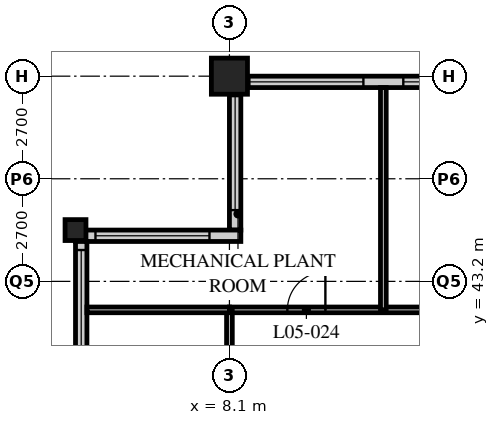
"""IFC4 building model, lengths in metres.
Left out: names, types, materials, properties, quantities, classifications, styles, units other than length and angle.
Written with IfcOpenShell. Run it as: python <this file> out.ifc"""

import sys

from ifc_helpers import new_model, si_unit, direction, frame, frame_2d, origin, origin_2d, place, context, subcontext, project, spatial, rectangle, hollow_rectangle, extrude, element, fill, save


model = new_model("IFC4")
c1 = context("Model", 3, precision=1e-05, world=origin(), true_north=direction((0.0, 1.0)))
c2 = subcontext(c1, "Body", "Model", "MODEL_VIEW")
j1 = project(units=[si_unit("LENGTHUNIT", "METRE"), si_unit("PLANEANGLEUNIT", "RADIAN")], contexts=[c1])
p1 = place(None, origin())
s1 = spatial("IfcSite", under=j1, at=p1, CompositionType="ELEMENT")
p2 = place(p1, origin())
s2 = spatial("IfcBuilding", under=s1, at=p2, CompositionType="ELEMENT")
p3 = place(p2, frame((0.0, 0.0, 27.6)))
s3 = spatial("IfcBuildingStorey", under=s2, at=p3, CompositionType="ELEMENT", Elevation=27.6)
p4 = place(p3, frame((4.05, 44.55, 0.0), z_axis=(0.0, 0.0, 1.0), x_axis=(1.0, 0.0, 0.0)))
e1 = element("IfcColumn", 1, at=p4, inside=s3, PredefinedType="COLUMN", context=c2, shape_type="SweptSolid", body=[
    extrude(hollow_rectangle(XDim=0.55, YDim=0.55, WallThickness=0.05, at=origin_2d()), origin(), (0.0, 0.0, 1.0), 5.4),
])
p5 = place(p3, frame((8.1, 48.6, 0.0), z_axis=(0.0, 0.0, 1.0), x_axis=(1.0, 0.0, 0.0)))
e2 = element("IfcColumn", 2, at=p5, inside=s3, PredefinedType="COLUMN", context=c2, shape_type="SweptSolid", body=[
    extrude(hollow_rectangle(XDim=0.95, YDim=0.95, WallThickness=0.1, at=origin_2d()), origin(), (0.0, 0.0, 1.0), 5.4),
])
p6 = place(p3, frame((48.3, 48.45, 0.0), z_axis=(0.0, 0.0, 1.0), x_axis=(-1.0, 0.0, 0.0)))
e3 = element("IfcWall", 3, at=p6, inside=s3, PredefinedType="SOLIDWALL", context=c2, shape_type="SweptSolid", body=[
    extrude(rectangle(XDim=40.2, YDim=0.3, at=frame_2d((20.1, 0.0))), origin(), (0.0, 0.0, 1.0), 5.19),
])
p7 = place(p6, frame((0.225, 0.0, 0.9)))
e4 = element("IfcOpeningElement", 4, at=p7, cuts=e3, PredefinedType="OPENING", context=c2, shape_type="SweptSolid", body=[
    extrude(rectangle(XDim=3.0, YDim=3.0, at=frame_2d((1.5, 1.5))), frame((0.0, 0.16, 0.0), z_axis=(0.0, -1.0, 0.0), x_axis=(1.0, 0.0, 0.0)), (0.0, 0.0, 1.0), 0.32),
])
p8 = place(p6, frame((4.275, 0.0, 0.9)))
e5 = element("IfcOpeningElement", 5, at=p8, cuts=e3, PredefinedType="OPENING", context=c2, shape_type="SweptSolid", body=[
    extrude(rectangle(XDim=3.0, YDim=3.0, at=frame_2d((1.5, 1.5))), frame((0.0, 0.16, 0.0), z_axis=(0.0, -1.0, 0.0), x_axis=(1.0, 0.0, 0.0)), (0.0, 0.0, 1.0), 0.32),
])
p9 = place(p6, frame((8.325, 0.0, 0.9)))
e6 = element("IfcOpeningElement", 6, at=p9, cuts=e3, PredefinedType="OPENING", context=c2, shape_type="SweptSolid", body=[
    extrude(rectangle(XDim=3.0, YDim=3.0, at=frame_2d((1.5, 1.5))), frame((0.0, 0.16, 0.0), z_axis=(0.0, -1.0, 0.0), x_axis=(1.0, 0.0, 0.0)), (0.0, 0.0, 1.0), 0.32),
])
p10 = place(p6, frame((12.375, 0.0, 0.9)))
e7 = element("IfcOpeningElement", 7, at=p10, cuts=e3, PredefinedType="OPENING", context=c2, shape_type="SweptSolid", body=[
    extrude(rectangle(XDim=3.0, YDim=3.0, at=frame_2d((1.5, 1.5))), frame((0.0, 0.16, 0.0), z_axis=(0.0, -1.0, 0.0), x_axis=(1.0, 0.0, 0.0)), (0.0, 0.0, 1.0), 0.32),
])
p11 = place(p6, frame((16.425, 0.0, 0.9)))
e8 = element("IfcOpeningElement", 8, at=p11, cuts=e3, PredefinedType="OPENING", context=c2, shape_type="SweptSolid", body=[
    extrude(rectangle(XDim=3.0, YDim=3.0, at=frame_2d((1.5, 1.5))), frame((0.0, 0.16, 0.0), z_axis=(0.0, -1.0, 0.0), x_axis=(1.0, 0.0, 0.0)), (0.0, 0.0, 1.0), 0.32),
])
p12 = place(p6, frame((20.475, 0.0, 0.9)))
e9 = element("IfcOpeningElement", 9, at=p12, cuts=e3, PredefinedType="OPENING", context=c2, shape_type="SweptSolid", body=[
    extrude(rectangle(XDim=3.0, YDim=3.0, at=frame_2d((1.5, 1.5))), frame((0.0, 0.16, 0.0), z_axis=(0.0, -1.0, 0.0), x_axis=(1.0, 0.0, 0.0)), (0.0, 0.0, 1.0), 0.32),
])
p13 = place(p6, frame((24.525, 0.0, 0.9)))
e10 = element("IfcOpeningElement", 10, at=p13, cuts=e3, PredefinedType="OPENING", context=c2, shape_type="SweptSolid", body=[
    extrude(rectangle(XDim=3.0, YDim=3.0, at=frame_2d((1.5, 1.5))), frame((0.0, 0.16, 0.0), z_axis=(0.0, -1.0, 0.0), x_axis=(1.0, 0.0, 0.0)), (0.0, 0.0, 1.0), 0.32),
])
p14 = place(p6, frame((28.575, 0.0, 0.9)))
e11 = element("IfcOpeningElement", 11, at=p14, cuts=e3, PredefinedType="OPENING", context=c2, shape_type="SweptSolid", body=[
    extrude(rectangle(XDim=3.0, YDim=3.0, at=frame_2d((1.5, 1.5))), frame((0.0, 0.16, 0.0), z_axis=(0.0, -1.0, 0.0), x_axis=(1.0, 0.0, 0.0)), (0.0, 0.0, 1.0), 0.32),
])
p15 = place(p6, frame((32.625, 0.0, 0.9)))
e12 = element("IfcOpeningElement", 12, at=p15, cuts=e3, PredefinedType="OPENING", context=c2, shape_type="SweptSolid", body=[
    extrude(rectangle(XDim=3.0, YDim=3.0, at=frame_2d((1.5, 1.5))), frame((0.0, 0.16, 0.0), z_axis=(0.0, -1.0, 0.0), x_axis=(1.0, 0.0, 0.0)), (0.0, 0.0, 1.0), 0.32),
])
p16 = place(p6, frame((36.675, 0.0, 0.9)))
e13 = element("IfcOpeningElement", 13, at=p16, cuts=e3, PredefinedType="OPENING", context=c2, shape_type="SweptSolid", body=[
    extrude(rectangle(XDim=3.0, YDim=3.0, at=frame_2d((1.5, 1.5))), frame((0.0, 0.16, 0.0), z_axis=(0.0, -1.0, 0.0), x_axis=(1.0, 0.0, 0.0)), (0.0, 0.0, 1.0), 0.32),
])
p17 = place(p3, frame((8.25, 48.3, 0.0), z_axis=(0.0, 0.0, 1.0), x_axis=(0.0, -1.0, 0.0)))
e14 = element("IfcWall", 14, at=p17, inside=s3, PredefinedType="SOLIDWALL", context=c2, shape_type="SweptSolid", body=[
    extrude(rectangle(XDim=3.75, YDim=0.3, at=frame_2d((1.875, 0.0))), origin(), (0.0, 0.0, 1.0), 5.19),
])
p18 = place(p17, frame((0.225, 0.0, 0.9)))
e15 = element("IfcOpeningElement", 15, at=p18, cuts=e14, PredefinedType="OPENING", context=c2, shape_type="SweptSolid", body=[
    extrude(rectangle(XDim=3.0, YDim=3.0, at=frame_2d((1.5, 1.5))), frame((0.0, 0.16, 0.0), z_axis=(0.0, -1.0, 0.0), x_axis=(1.0, 0.0, 0.0)), (0.0, 0.0, 1.0), 0.32),
])
p19 = place(p3, frame((8.4, 44.4, 0.0), z_axis=(0.0, 0.0, 1.0), x_axis=(-1.0, 0.0, 0.0)))
e16 = element("IfcWall", 16, at=p19, inside=s3, PredefinedType="SOLIDWALL", context=c2, shape_type="SweptSolid", body=[
    extrude(rectangle(XDim=4.35, YDim=0.3, at=frame_2d((2.175, 0.0))), origin(), (0.0, 0.0, 1.0), 5.19),
])
p20 = place(p19, frame((0.825, 0.0, 0.9)))
e17 = element("IfcOpeningElement", 17, at=p20, cuts=e16, PredefinedType="OPENING", context=c2, shape_type="SweptSolid", body=[
    extrude(rectangle(XDim=3.0, YDim=3.0, at=frame_2d((1.5, 1.5))), frame((0.0, 0.16, 0.0), z_axis=(0.0, -1.0, 0.0), x_axis=(1.0, 0.0, 0.0)), (0.0, 0.0, 1.0), 0.32),
])
p21 = place(p3, frame((4.2, 44.25, 0.0), z_axis=(0.0, 0.0, 1.0), x_axis=(0.0, -1.0, 0.0)))
e18 = element("IfcWall", 18, at=p21, inside=s3, PredefinedType="SOLIDWALL", context=c2, shape_type="SweptSolid", body=[
    extrude(rectangle(XDim=3.75, YDim=0.3, at=frame_2d((1.875, 0.0))), origin(), (0.0, 0.0, 1.0), 5.19),
])
p22 = place(p21, frame((0.225, 0.0, 0.9)))
e19 = element("IfcOpeningElement", 19, at=p22, cuts=e18, PredefinedType="OPENING", context=c2, shape_type="SweptSolid", body=[
    extrude(rectangle(XDim=3.0, YDim=3.0, at=frame_2d((1.5, 1.5))), frame((0.0, 0.16, 0.0), z_axis=(0.0, -1.0, 0.0), x_axis=(1.0, 0.0, 0.0)), (0.0, 0.0, 1.0), 0.32),
])
p23 = place(p3, frame((8.1, 42.45, 0.0), z_axis=(0.0, 0.0, 1.0), x_axis=(1.0, 0.0, 0.0)))
e20 = element("IfcWall", 20, at=p23, inside=s3, PredefinedType="PARTITIONING", context=c2, shape_type="SweptSolid", body=[
    extrude(rectangle(XDim=40.5, YDim=0.15, at=frame_2d((20.25, 0.0))), origin(), (0.0, 0.0, 1.0), 5.19),
])
p24 = place(p23, frame((8.2, 0.0, 0.0)))
e21 = element("IfcOpeningElement", 21, at=p24, cuts=e20, PredefinedType="OPENING", context=c2, shape_type="SweptSolid", body=[
    extrude(rectangle(XDim=1.8, YDim=2.4, at=frame_2d((0.9, 1.2))), frame((0.0, 0.085, 0.0), z_axis=(0.0, -1.0, 0.0), x_axis=(1.0, 0.0, 0.0)), (0.0, 0.0, 1.0), 0.17),
])
p25 = place(p23, frame((19.35, 0.0, 0.0)))
e22 = element("IfcOpeningElement", 22, at=p25, cuts=e20, PredefinedType="OPENING", context=c2, shape_type="SweptSolid", body=[
    extrude(rectangle(XDim=1.8, YDim=2.4, at=frame_2d((0.9, 1.2))), frame((0.0, 0.085, 0.0), z_axis=(0.0, -1.0, 0.0), x_axis=(1.0, 0.0, 0.0)), (0.0, 0.0, 1.0), 0.17),
])
p26 = place(p23, frame((32.5, 0.0, 0.0)))
e23 = element("IfcOpeningElement", 23, at=p26, cuts=e20, PredefinedType="OPENING", context=c2, shape_type="SweptSolid", body=[
    extrude(rectangle(XDim=1.8, YDim=2.4, at=frame_2d((0.9, 1.2))), frame((0.0, 0.085, 0.0), z_axis=(0.0, -1.0, 0.0), x_axis=(1.0, 0.0, 0.0)), (0.0, 0.0, 1.0), 0.17),
])
p27 = place(p23, frame((37.975, 0.0, 0.0)))
e24 = element("IfcOpeningElement", 24, at=p27, cuts=e20, PredefinedType="OPENING", context=c2, shape_type="SweptSolid", body=[
    extrude(rectangle(XDim=1.0, YDim=2.1, at=frame_2d((0.5, 1.05))), frame((0.0, 0.085, 0.0), z_axis=(0.0, -1.0, 0.0), x_axis=(1.0, 0.0, 0.0)), (0.0, 0.0, 1.0), 0.17),
])
p28 = place(p23, frame((1.525, 0.0, 0.0)))
e25 = element("IfcOpeningElement", 25, at=p28, cuts=e20, PredefinedType="OPENING", context=c2, shape_type="SweptSolid", body=[
    extrude(rectangle(XDim=1.0, YDim=2.1, at=frame_2d((0.5, 1.05))), frame((0.0, 0.085, 0.0), z_axis=(0.0, -1.0, 0.0), x_axis=(1.0, 0.0, 0.0)), (0.0, 0.0, 1.0), 0.17),
])
p29 = place(p3, frame((8.1, 8.1, 0.0), z_axis=(0.0, 0.0, 1.0), x_axis=(0.0, 1.0, 0.0)))
e26 = element("IfcWall", 26, at=p29, inside=s3, PredefinedType="PARTITIONING", context=c2, shape_type="SweptSolid", body=[
    extrude(rectangle(XDim=34.35, YDim=0.15, at=frame_2d((17.175, 0.0))), origin(), (0.0, 0.0, 1.0), 4.578),
])
p30 = place(p29, frame((8.95, 0.0, 0.0)))
e27 = element("IfcOpeningElement", 27, at=p30, cuts=e26, PredefinedType="OPENING", context=c2, shape_type="SweptSolid", body=[
    extrude(rectangle(XDim=1.8, YDim=2.4, at=frame_2d((0.9, 1.2))), frame((0.0, 0.085, 0.0), z_axis=(0.0, -1.0, 0.0), x_axis=(1.0, 0.0, 0.0)), (0.0, 0.0, 1.0), 0.17),
])
p31 = place(p29, frame((25.125, 0.0, 0.0)))
e28 = element("IfcOpeningElement", 28, at=p31, cuts=e26, PredefinedType="OPENING", context=c2, shape_type="SweptSolid", body=[
    extrude(rectangle(XDim=1.8, YDim=2.4, at=frame_2d((0.9, 1.2))), frame((0.0, 0.085, 0.0), z_axis=(0.0, -1.0, 0.0), x_axis=(1.0, 0.0, 0.0)), (0.0, 0.0, 1.0), 0.17),
])
p32 = place(p3, frame((4.35, 42.45, 0.0), z_axis=(0.0, 0.0, 1.0), x_axis=(1.0, 0.0, 0.0)))
e29 = element("IfcWall", 29, at=p32, inside=s3, PredefinedType="PARTITIONING", context=c2, shape_type="SweptSolid", body=[
    extrude(rectangle(XDim=3.75, YDim=0.15, at=frame_2d((1.875, 0.0))), origin(), (0.0, 0.0, 1.0), 5.19),
])
p33 = place(p3, frame((12.15, 42.45, 0.0), z_axis=(0.0, 0.0, 1.0), x_axis=(0.0, 1.0, 0.0)))
e30 = element("IfcWall", 30, at=p33, inside=s3, PredefinedType="PARTITIONING", context=c2, shape_type="SweptSolid", body=[
    extrude(rectangle(XDim=5.85, YDim=0.15, at=frame_2d((2.925, 0.0))), origin(), (0.0, 0.0, 1.0), 5.19),
])
p34 = place(p15, origin())
e31 = element("IfcWindow", 31, at=p34, inside=s3, PartitioningType="SINGLE_PANEL", PredefinedType="USERDEFINED", context=c2, shape_type="SweptSolid", body=[
    extrude(rectangle(XDim=3.0, YDim=3.0, at=frame_2d((1.5, 1.5))), frame((0.0, 0.075, 0.0), z_axis=(0.0, -1.0, 0.0), x_axis=(1.0, 0.0, 0.0)), (0.0, 0.0, 1.0), 0.15),
])
fill(e12, e31)
p35 = place(p16, origin())
e32 = element("IfcWindow", 32, at=p35, inside=s3, PartitioningType="SINGLE_PANEL", PredefinedType="USERDEFINED", context=c2, shape_type="SweptSolid", body=[
    extrude(rectangle(XDim=3.0, YDim=3.0, at=frame_2d((1.5, 1.5))), frame((0.0, 0.075, 0.0), z_axis=(0.0, -1.0, 0.0), x_axis=(1.0, 0.0, 0.0)), (0.0, 0.0, 1.0), 0.15),
])
fill(e13, e32)
p36 = place(p18, origin())
e33 = element("IfcWindow", 33, at=p36, inside=s3, PartitioningType="SINGLE_PANEL", PredefinedType="WINDOW", context=c2, shape_type="SweptSolid", body=[
    extrude(rectangle(XDim=3.0, YDim=3.0, at=frame_2d((1.5, 1.5))), frame((0.0, 0.03, 0.0), z_axis=(0.0, -1.0, 0.0), x_axis=(1.0, 0.0, 0.0)), (0.0, 0.0, 1.0), 0.06),
])
fill(e15, e33)
p37 = place(p20, origin())
e34 = element("IfcWindow", 34, at=p37, inside=s3, PartitioningType="SINGLE_PANEL", PredefinedType="WINDOW", context=c2, shape_type="SweptSolid", body=[
    extrude(rectangle(XDim=3.0, YDim=3.0, at=frame_2d((1.5, 1.5))), frame((0.0, 0.03, 0.0), z_axis=(0.0, -1.0, 0.0), x_axis=(1.0, 0.0, 0.0)), (0.0, 0.0, 1.0), 0.06),
])
fill(e17, e34)
p38 = place(p22, origin())
e35 = element("IfcWindow", 35, at=p38, inside=s3, PartitioningType="SINGLE_PANEL", PredefinedType="WINDOW", context=c2, shape_type="SweptSolid", body=[
    extrude(rectangle(XDim=3.0, YDim=3.0, at=frame_2d((1.5, 1.5))), frame((0.0, 0.03, 0.0), z_axis=(0.0, -1.0, 0.0), x_axis=(1.0, 0.0, 0.0)), (0.0, 0.0, 1.0), 0.06),
])
fill(e19, e35)
p39 = place(p28, origin())
e36 = element("IfcDoor", 36, at=p39, inside=s3, OperationType="SINGLE_SWING_RIGHT", PredefinedType="DOOR", context=c2, shape_type="SweptSolid", body=[
    extrude(rectangle(XDim=1.0, YDim=2.1, at=frame_2d((0.5, 1.05))), frame((0.0, 0.025, 0.0), z_axis=(0.0, -1.0, 0.0), x_axis=(1.0, 0.0, 0.0)), (0.0, 0.0, 1.0), 0.05),
])
fill(e25, e36)
save(model, sys.argv[1])
